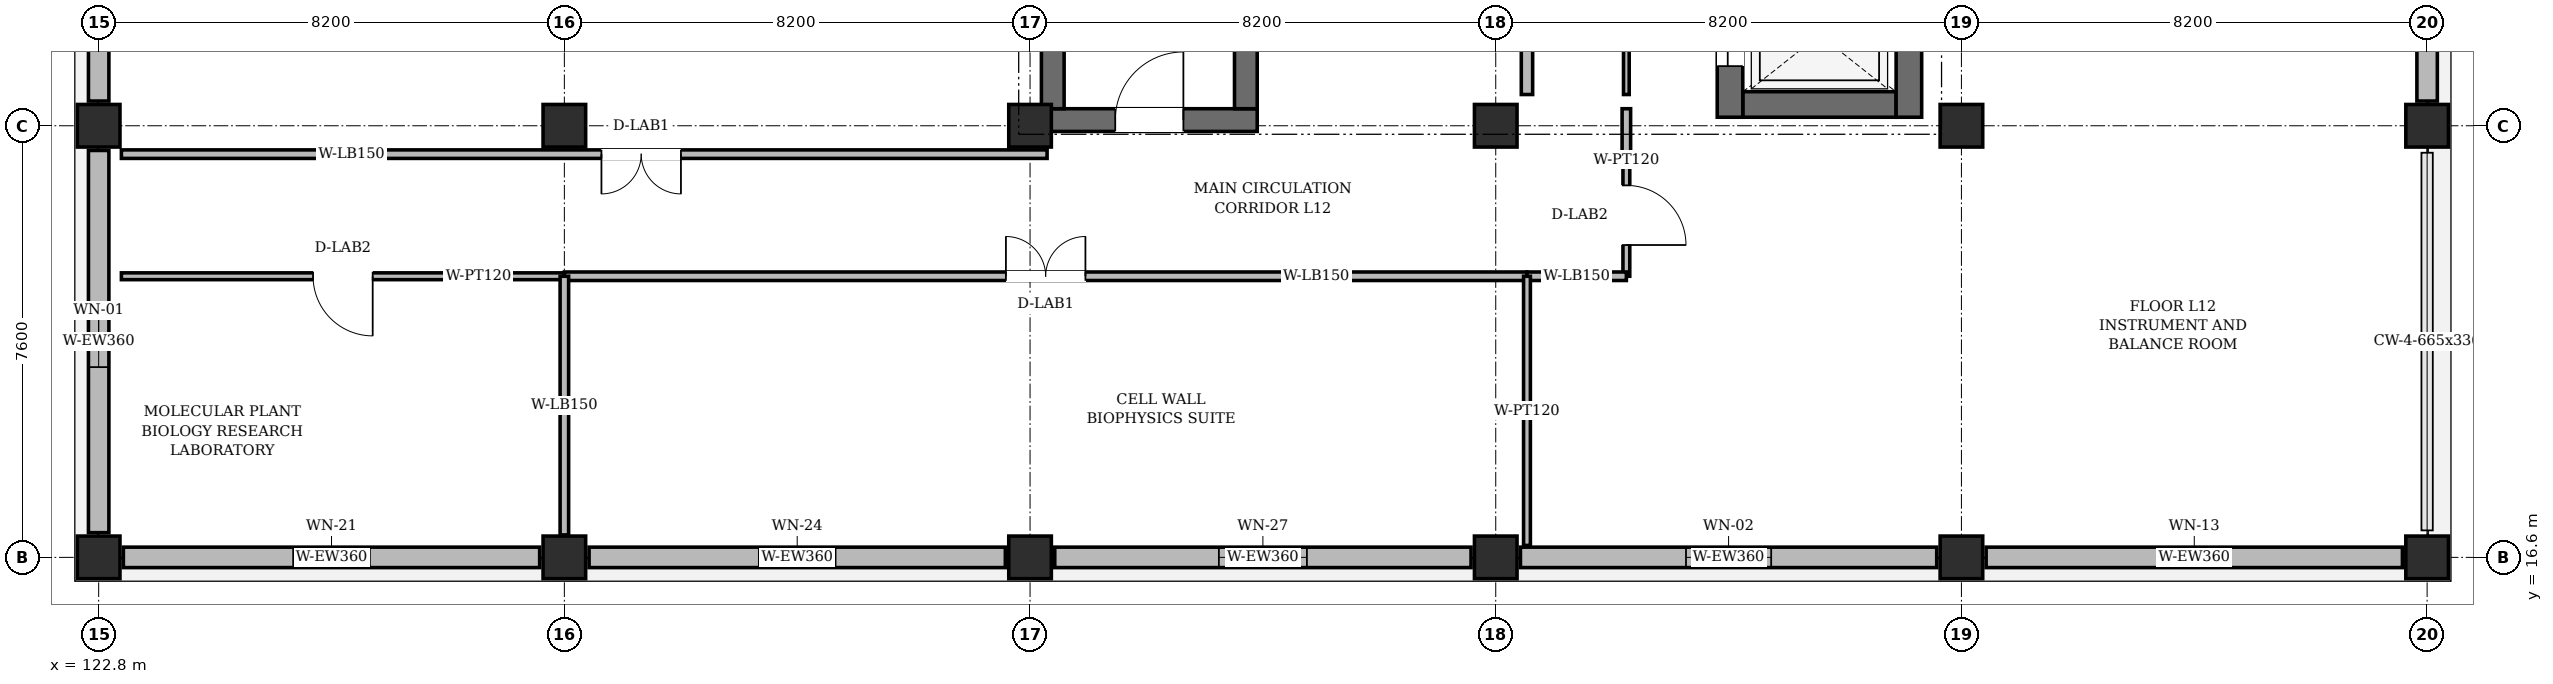
"""IFC4 building model, lengths in metres.
Left out: names, types, materials, properties, quantities, classifications, styles, units other than length and angle.
Written with IfcOpenShell. Run it as: python <this file> out.ifc"""

import sys

from ifc_helpers import new_model, si_unit, direction, frame, frame_2d, origin, origin_2d, place, context, subcontext, project, spatial, rectangle, extrude, element, fill, save


model = new_model("IFC4")
c1 = context("Model", 3, precision=1e-05, world=origin(), true_north=direction((0.0, 1.0)))
c2 = subcontext(c1, "Body", "Model", "MODEL_VIEW")
j1 = project(units=[si_unit("LENGTHUNIT", "METRE"), si_unit("PLANEANGLEUNIT", "RADIAN")], contexts=[c1])
p1 = place(None, origin())
s1 = spatial("IfcSite", under=j1, at=p1, CompositionType="ELEMENT")
p2 = place(p1, origin())
s2 = spatial("IfcBuilding", under=s1, at=p2, CompositionType="ELEMENT")
p3 = place(p2, frame((0.0, 0.0, 53.4)))
s3 = spatial("IfcBuildingStorey", under=s2, at=p3, CompositionType="ELEMENT", Elevation=53.4)
for number, where, z_axis, x_axis in (
    (1, (122.8, 16.6, 0.0), (0.0, 0.0, 1.0), (1.0, 0.0, 0.0)),
    (2, (122.8, 24.2, 0.0), (0.0, 0.0, 1.0), (1.0, 0.0, 0.0)),
    (3, (131.0, 16.6, 0.0), (0.0, 0.0, 1.0), (1.0, 0.0, 0.0)),
    (4, (131.0, 24.2, 0.0), (0.0, 0.0, 1.0), (1.0, 0.0, 0.0)),
    (5, (139.2, 16.6, 0.0), (0.0, 0.0, 1.0), (1.0, 0.0, 0.0)),
    (6, (139.2, 24.2, 0.0), (0.0, 0.0, 1.0), (1.0, 0.0, 0.0)),
    (7, (147.4, 16.6, 0.0), (0.0, 0.0, 1.0), (1.0, 0.0, 0.0)),
    (8, (147.4, 24.2, 0.0), (0.0, 0.0, 1.0), (1.0, 0.0, 0.0)),
    (9, (155.6, 16.6, 0.0), (0.0, 0.0, 1.0), (1.0, 0.0, 0.0)),
    (10, (155.6, 24.2, 0.0), (0.0, 0.0, 1.0), (1.0, 0.0, 0.0)),
    (11, (163.8, 16.6, 0.0), (0.0, 0.0, 1.0), (1.0, 0.0, 0.0)),
    (12, (163.8, 24.2, 0.0), (0.0, 0.0, 1.0), (1.0, 0.0, 0.0)),
):
    element("IfcColumn", number, at=place(p3, frame(where, z_axis=z_axis, x_axis=x_axis)), inside=s3, PredefinedType="COLUMN", context=c2, shape_type="SweptSolid", body=[
        extrude(rectangle(XDim=0.75, YDim=0.75, at=origin_2d()), origin(), (0.0, 0.0, 1.0), 3.96),
    ])
p4 = place(p3, frame((123.235, 16.6, 0.0), z_axis=(0.0, 0.0, 1.0), x_axis=(1.0, 0.0, 0.0)))
e13 = element("IfcWall", 13, at=p4, inside=s3, PredefinedType="SOLIDWALL", context=c2, shape_type="SweptSolid", body=[
    extrude(rectangle(XDim=7.33, YDim=0.36, at=frame_2d((3.665, 0.0))), origin(), (0.0, 0.0, 1.0), 3.345),
])
p5 = place(p4, frame((2.99, 0.0, 0.95)))
e14 = element("IfcOpeningElement", 14, at=p5, cuts=e13, PredefinedType="OPENING", context=c2, shape_type="SweptSolid", body=[
    extrude(rectangle(XDim=1.35, YDim=1.25, at=frame_2d((0.675, 0.625))), frame((0.0, 0.192, 0.0), z_axis=(0.0, -1.0, 0.0), x_axis=(1.0, 0.0, 0.0)), (0.0, 0.0, 1.0), 0.384),
])
p6 = place(p3, frame((131.435, 16.6, 0.0), z_axis=(0.0, 0.0, 1.0), x_axis=(1.0, 0.0, 0.0)))
e15 = element("IfcWall", 15, at=p6, inside=s3, PredefinedType="SOLIDWALL", context=c2, shape_type="SweptSolid", body=[
    extrude(rectangle(XDim=7.33, YDim=0.36, at=frame_2d((3.665, 0.0))), origin(), (0.0, 0.0, 1.0), 3.345),
])
p7 = place(p6, frame((2.99, 0.0, 0.95)))
e16 = element("IfcOpeningElement", 16, at=p7, cuts=e15, PredefinedType="OPENING", context=c2, shape_type="SweptSolid", body=[
    extrude(rectangle(XDim=1.35, YDim=2.05, at=frame_2d((0.675, 1.025))), frame((0.0, 0.192, 0.0), z_axis=(0.0, -1.0, 0.0), x_axis=(1.0, 0.0, 0.0)), (0.0, 0.0, 1.0), 0.384),
])
p8 = place(p3, frame((139.635, 16.6, 0.0), z_axis=(0.0, 0.0, 1.0), x_axis=(1.0, 0.0, 0.0)))
e17 = element("IfcWall", 17, at=p8, inside=s3, PredefinedType="SOLIDWALL", context=c2, shape_type="SweptSolid", body=[
    extrude(rectangle(XDim=7.33, YDim=0.36, at=frame_2d((3.665, 0.0))), origin(), (0.0, 0.0, 1.0), 3.345),
])
p9 = place(p8, frame((2.89, 0.0, 0.95)))
e18 = element("IfcOpeningElement", 18, at=p9, cuts=e17, PredefinedType="OPENING", context=c2, shape_type="SweptSolid", body=[
    extrude(rectangle(XDim=1.55, YDim=1.75, at=frame_2d((0.775, 0.875))), frame((0.0, 0.192, 0.0), z_axis=(0.0, -1.0, 0.0), x_axis=(1.0, 0.0, 0.0)), (0.0, 0.0, 1.0), 0.384),
])
p10 = place(p3, frame((147.835, 16.6, 0.0), z_axis=(0.0, 0.0, 1.0), x_axis=(1.0, 0.0, 0.0)))
e19 = element("IfcWall", 19, at=p10, inside=s3, PredefinedType="SOLIDWALL", context=c2, shape_type="SweptSolid", body=[
    extrude(rectangle(XDim=7.33, YDim=0.36, at=frame_2d((3.665, 0.0))), origin(), (0.0, 0.0, 1.0), 3.345),
])
p11 = place(p10, frame((2.915, 0.0, 0.95)))
e20 = element("IfcOpeningElement", 20, at=p11, cuts=e19, PredefinedType="OPENING", context=c2, shape_type="SweptSolid", body=[
    extrude(rectangle(XDim=1.5, YDim=2.1, at=frame_2d((0.75, 1.05))), frame((0.0, 0.192, 0.0), z_axis=(0.0, -1.0, 0.0), x_axis=(1.0, 0.0, 0.0)), (0.0, 0.0, 1.0), 0.384),
])
p12 = place(p3, frame((156.035, 16.6, 0.0), z_axis=(0.0, 0.0, 1.0), x_axis=(1.0, 0.0, 0.0)))
e21 = element("IfcWall", 21, at=p12, inside=s3, PredefinedType="SOLIDWALL", context=c2, shape_type="SweptSolid", body=[
    extrude(rectangle(XDim=7.33, YDim=0.36, at=frame_2d((3.665, 0.0))), origin(), (0.0, 0.0, 1.0), 3.345),
])
p13 = place(p12, frame((3.19, 0.0, 0.95)))
e22 = element("IfcOpeningElement", 22, at=p13, cuts=e21, PredefinedType="OPENING", context=c2, shape_type="SweptSolid", body=[
    extrude(rectangle(XDim=0.95, YDim=1.25, at=frame_2d((0.475, 0.625))), frame((0.0, 0.192, 0.0), z_axis=(0.0, -1.0, 0.0), x_axis=(1.0, 0.0, 0.0)), (0.0, 0.0, 1.0), 0.384),
])
p14 = place(p3, frame((163.8, 24.635, 0.0), z_axis=(0.0, 0.0, 1.0), x_axis=(0.0, 1.0, 0.0)))
e23 = element("IfcWall", 23, at=p14, inside=s3, PredefinedType="SOLIDWALL", context=c2, shape_type="SweptSolid", body=[
    extrude(rectangle(XDim=6.73, YDim=0.36, at=frame_2d((3.365, 0.0))), origin(), (0.0, 0.0, 1.0), 3.345),
])
p15 = place(p14, frame((2.59, 0.0, 0.95)))
e24 = element("IfcOpeningElement", 24, at=p15, cuts=e23, PredefinedType="OPENING", context=c2, shape_type="SweptSolid", body=[
    extrude(rectangle(XDim=1.55, YDim=1.25, at=frame_2d((0.775, 0.625))), frame((0.0, 0.192, 0.0), z_axis=(0.0, -1.0, 0.0), x_axis=(1.0, 0.0, 0.0)), (0.0, 0.0, 1.0), 0.384),
])
p16 = place(p3, frame((122.8, 31.365, 0.0), z_axis=(0.0, 0.0, 1.0), x_axis=(0.0, -1.0, 0.0)))
e25 = element("IfcWall", 25, at=p16, inside=s3, PredefinedType="SOLIDWALL", context=c2, shape_type="SweptSolid", body=[
    extrude(rectangle(XDim=6.73, YDim=0.36, at=frame_2d((3.365, 0.0))), origin(), (0.0, 0.0, 1.0), 3.345),
])
p17 = place(p16, frame((2.59, 0.0, 0.95)))
e26 = element("IfcOpeningElement", 26, at=p17, cuts=e25, PredefinedType="OPENING", context=c2, shape_type="SweptSolid", body=[
    extrude(rectangle(XDim=1.55, YDim=1.5, at=frame_2d((0.775, 0.75))), frame((0.0, 0.192, 0.0), z_axis=(0.0, -1.0, 0.0), x_axis=(1.0, 0.0, 0.0)), (0.0, 0.0, 1.0), 0.384),
])
p18 = place(p3, frame((122.8, 23.765, 0.0), z_axis=(0.0, 0.0, 1.0), x_axis=(0.0, -1.0, 0.0)))
e27 = element("IfcWall", 27, at=p18, inside=s3, PredefinedType="SOLIDWALL", context=c2, shape_type="SweptSolid", body=[
    extrude(rectangle(XDim=6.73, YDim=0.36, at=frame_2d((3.365, 0.0))), origin(), (0.0, 0.0, 1.0), 3.345),
])
p19 = place(p18, frame((2.915, 0.0, 0.95)))
e28 = element("IfcOpeningElement", 28, at=p19, cuts=e27, PredefinedType="OPENING", context=c2, shape_type="SweptSolid", body=[
    extrude(rectangle(XDim=0.9, YDim=2.1, at=frame_2d((0.45, 1.05))), frame((0.0, 0.192, 0.0), z_axis=(0.0, -1.0, 0.0), x_axis=(1.0, 0.0, 0.0)), (0.0, 0.0, 1.0), 0.384),
])
p20 = place(p3, frame((139.4, 24.3, 0.0), z_axis=(0.0, 0.0, 1.0), x_axis=(1.0, 0.0, 0.0)))
e29 = element("IfcWall", 29, at=p20, inside=s3, PredefinedType="SHEAR", context=c2, shape_type="SweptSolid", body=[
    extrude(rectangle(XDim=3.8, YDim=0.4, at=frame_2d((1.9, 0.0))), origin(), (0.0, 0.0, 1.0), 3.96),
])
p21 = place(p20, frame((1.3, 0.0, 0.0)))
e30 = element("IfcOpeningElement", 30, at=p21, cuts=e29, PredefinedType="OPENING", context=c2, shape_type="SweptSolid", body=[
    extrude(rectangle(XDim=1.2, YDim=2.2, at=frame_2d((0.6, 1.1))), frame((0.0, 0.212, 0.0), z_axis=(0.0, -1.0, 0.0), x_axis=(1.0, 0.0, 0.0)), (0.0, 0.0, 1.0), 0.424),
])
for number, where, z_axis, x_axis in (
    (31, (139.6, 24.5, 0.0), (0.0, 0.0, 1.0), (0.0, 1.0, 0.0)),
    (32, (143.0, 24.5, 0.0), (0.0, 0.0, 1.0), (0.0, 1.0, 0.0)),
):
    element("IfcWall", number, at=place(p3, frame(where, z_axis=z_axis, x_axis=x_axis)), inside=s3, PredefinedType="SHEAR", context=c2, shape_type="SweptSolid", body=[
        extrude(rectangle(XDim=7.0, YDim=0.4, at=frame_2d((3.5, 0.0))), origin(), (0.0, 0.0, 1.0), 3.96),
    ])
p22 = place(p3, frame((151.75, 24.575, 0.0), z_axis=(0.0, 0.0, 1.0), x_axis=(1.0, 0.0, 0.0)))
e33 = element("IfcWall", 33, at=p22, inside=s3, PredefinedType="SHEAR", context=c2, shape_type="SweptSolid", body=[
    extrude(rectangle(XDim=2.7, YDim=0.45, at=frame_2d((1.35, 0.0))), origin(), (0.0, 0.0, 1.0), 3.96),
])
p23 = place(p3, frame((151.525, 24.35, 0.0), z_axis=(0.0, 0.0, 1.0), x_axis=(0.0, 1.0, 0.0)))
e34 = element("IfcWall", 34, at=p23, inside=s3, PredefinedType="SHEAR", context=c2, shape_type="SweptSolid", body=[
    extrude(rectangle(XDim=2.9, YDim=0.45, at=frame_2d((1.45, 0.0))), origin(), (0.0, 0.0, 1.0), 3.96),
])
p24 = place(p23, frame((0.9, 0.0, 0.0)))
e35 = element("IfcOpeningElement", 35, at=p24, cuts=e34, PredefinedType="OPENING", context=c2, shape_type="SweptSolid", body=[
    extrude(rectangle(XDim=1.1, YDim=2.2, at=frame_2d((0.55, 1.1))), frame((0.0, 0.237, 0.0), z_axis=(0.0, -1.0, 0.0), x_axis=(1.0, 0.0, 0.0)), (0.0, 0.0, 1.0), 0.474),
])
p25 = place(p3, frame((154.675, 24.35, 0.0), z_axis=(0.0, 0.0, 1.0), x_axis=(0.0, 1.0, 0.0)))
e36 = element("IfcWall", 36, at=p25, inside=s3, PredefinedType="SHEAR", context=c2, shape_type="SweptSolid", body=[
    extrude(rectangle(XDim=2.9, YDim=0.45, at=frame_2d((1.45, 0.0))), origin(), (0.0, 0.0, 1.0), 3.96),
])
p26 = place(p3, frame((147.95, 31.75, 0.0), z_axis=(0.0, 0.0, 1.0), x_axis=(0.0, -1.0, 0.0)))
e37 = element("IfcWall", 37, at=p26, inside=s3, PredefinedType="PARTITIONING", context=c2, shape_type="SweptSolid", body=[
    extrude(rectangle(XDim=7.0, YDim=0.2, at=frame_2d((3.5, 0.0))), origin(), (0.0, 0.0, 1.0), 3.805),
])
p27 = place(p26, frame((2.75, 0.0, 0.0)))
e38 = element("IfcOpeningElement", 38, at=p27, cuts=e37, PredefinedType="OPENING", context=c2, shape_type="SweptSolid", body=[
    extrude(rectangle(XDim=1.5, YDim=2.2, at=frame_2d((0.75, 1.1))), frame((0.0, 0.112, 0.0), z_axis=(0.0, -1.0, 0.0), x_axis=(1.0, 0.0, 0.0)), (0.0, 0.0, 1.0), 0.224),
])
p28 = place(p3, frame((149.7, 24.75, 0.0), z_axis=(0.0, 0.0, 1.0), x_axis=(0.0, 1.0, 0.0)))
e39 = element("IfcWall", 39, at=p28, inside=s3, PredefinedType="PARTITIONING", context=c2, shape_type="SweptSolid", body=[
    extrude(rectangle(XDim=11.3, YDim=0.1, at=frame_2d((5.65, 0.0))), origin(), (0.0, 0.0, 1.0), 3.805),
])
p29 = place(p28, frame((4.75, 0.0, 0.0)))
e40 = element("IfcOpeningElement", 40, at=p29, cuts=e39, PredefinedType="OPENING", context=c2, shape_type="SweptSolid", body=[
    extrude(rectangle(XDim=1.8, YDim=2.4, at=frame_2d((0.9, 1.2))), frame((0.0, 0.062, 0.0), z_axis=(0.0, -1.0, 0.0), x_axis=(1.0, 0.0, 0.0)), (0.0, 0.0, 1.0), 0.124),
])
p30 = place(p3, frame((131.0, 21.55, 0.0), z_axis=(0.0, 0.0, 1.0), x_axis=(-1.0, 0.0, 0.0)))
e41 = element("IfcWall", 41, at=p30, inside=s3, PredefinedType="PARTITIONING", context=c2, shape_type="SweptSolid", body=[
    extrude(rectangle(XDim=7.8, YDim=0.12, at=frame_2d((3.9, 0.0))), origin(), (0.0, 0.0, 1.0), 3.635),
])
p31 = place(p30, frame((3.375, 0.0, 0.0)))
e42 = element("IfcOpeningElement", 42, at=p31, cuts=e41, PredefinedType="OPENING", context=c2, shape_type="SweptSolid", body=[
    extrude(rectangle(XDim=1.05, YDim=2.2, at=frame_2d((0.525, 1.1))), frame((0.0, 0.072, 0.0), z_axis=(0.0, -1.0, 0.0), x_axis=(1.0, 0.0, 0.0)), (0.0, 0.0, 1.0), 0.144),
])
p32 = place(p3, frame((147.95, 21.55, 0.0), z_axis=(0.0, 0.0, 1.0), x_axis=(-1.0, 0.0, 0.0)))
e43 = element("IfcWall", 43, at=p32, inside=s3, PredefinedType="PARTITIONING", context=c2, shape_type="SweptSolid", body=[
    extrude(rectangle(XDim=16.95, YDim=0.15, at=frame_2d((8.475, 0.0))), origin(), (0.0, 0.0, 1.0), 3.535),
])
p33 = place(p32, frame((7.775, 0.0, 0.0)))
e44 = element("IfcOpeningElement", 44, at=p33, cuts=e43, PredefinedType="OPENING", context=c2, shape_type="SweptSolid", body=[
    extrude(rectangle(XDim=1.4, YDim=2.2, at=frame_2d((0.7, 1.1))), frame((0.0, 0.087, 0.0), z_axis=(0.0, -1.0, 0.0), x_axis=(1.0, 0.0, 0.0)), (0.0, 0.0, 1.0), 0.174),
])
p34 = place(p3, frame((149.7, 24.5, 0.0), z_axis=(0.0, 0.0, 1.0), x_axis=(0.0, -1.0, 0.0)))
e45 = element("IfcWall", 45, at=p34, inside=s3, PredefinedType="PARTITIONING", context=c2, shape_type="SweptSolid", body=[
    extrude(rectangle(XDim=0.8, YDim=0.15, at=frame_2d((0.4, 0.0))), origin(), (0.0, 0.0, 1.0), 3.805),
])
p35 = place(p3, frame((149.7, 23.7, 0.0), z_axis=(0.0, 0.0, 1.0), x_axis=(0.0, -1.0, 0.0)))
e46 = element("IfcWall", 46, at=p35, inside=s3, PredefinedType="PARTITIONING", context=c2, shape_type="SweptSolid", body=[
    extrude(rectangle(XDim=2.15, YDim=0.12, at=frame_2d((1.075, 0.0))), origin(), (0.0, 0.0, 1.0), 3.805),
])
p36 = place(p35, frame((0.55, 0.0, 0.0)))
e47 = element("IfcOpeningElement", 47, at=p36, cuts=e46, PredefinedType="OPENING", context=c2, shape_type="SweptSolid", body=[
    extrude(rectangle(XDim=1.05, YDim=2.2, at=frame_2d((0.525, 1.1))), frame((0.0, 0.072, 0.0), z_axis=(0.0, -1.0, 0.0), x_axis=(1.0, 0.0, 0.0)), (0.0, 0.0, 1.0), 0.144),
])
p37 = place(p3, frame((149.7, 21.55, 0.0), z_axis=(0.0, 0.0, 1.0), x_axis=(-1.0, 0.0, 0.0)))
e48 = element("IfcWall", 48, at=p37, inside=s3, PredefinedType="PARTITIONING", context=c2, shape_type="SweptSolid", body=[
    extrude(rectangle(XDim=1.75, YDim=0.15, at=frame_2d((0.875, 0.0))), origin(), (0.0, 0.0, 1.0), 3.535),
])
p38 = place(p3, frame((123.2, 23.7, 0.0), z_axis=(0.0, 0.0, 1.0), x_axis=(1.0, 0.0, 0.0)))
e49 = element("IfcWall", 49, at=p38, inside=s3, PredefinedType="PARTITIONING", context=c2, shape_type="SweptSolid", body=[
    extrude(rectangle(XDim=16.3, YDim=0.15, at=frame_2d((8.15, 0.0))), origin(), (0.0, 0.0, 1.0), 3.805),
])
p39 = place(p38, frame((8.453, 0.0, 0.0)))
e50 = element("IfcOpeningElement", 50, at=p39, cuts=e49, PredefinedType="OPENING", context=c2, shape_type="SweptSolid", body=[
    extrude(rectangle(XDim=1.4, YDim=2.2, at=frame_2d((0.7, 1.1))), frame((0.0, 0.087, 0.0), z_axis=(0.0, -1.0, 0.0), x_axis=(1.0, 0.0, 0.0)), (0.0, 0.0, 1.0), 0.174),
])
p40 = place(p3, frame((131.0, 21.55, 0.0), z_axis=(0.0, 0.0, 1.0), x_axis=(0.0, -1.0, 0.0)))
e51 = element("IfcWall", 51, at=p40, inside=s3, PredefinedType="PARTITIONING", context=c2, shape_type="SweptSolid", body=[
    extrude(rectangle(XDim=4.555, YDim=0.15, at=frame_2d((2.277, 0.0))), origin(), (0.0, 0.0, 1.0), 3.295),
])
p41 = place(p3, frame((147.95, 21.55, 0.0), z_axis=(0.0, 0.0, 1.0), x_axis=(0.0, -1.0, 0.0)))
e52 = element("IfcWall", 52, at=p41, inside=s3, PredefinedType="PARTITIONING", context=c2, shape_type="SweptSolid", body=[
    extrude(rectangle(XDim=4.74, YDim=0.12, at=frame_2d((2.37, 0.0))), origin(), (0.0, 0.0, 1.0), 3.805),
])
p42 = place(p5, origin())
e53 = element("IfcWindow", 53, at=p42, inside=s3, PartitioningType="SINGLE_PANEL", PredefinedType="WINDOW", context=c2, shape_type="SweptSolid", body=[
    extrude(rectangle(XDim=1.35, YDim=1.25, at=frame_2d((0.675, 0.625))), frame((0.0, 0.03, 0.0), z_axis=(0.0, -1.0, 0.0), x_axis=(1.0, 0.0, 0.0)), (0.0, 0.0, 1.0), 0.06),
])
fill(e14, e53)
p43 = place(p7, origin())
e54 = element("IfcWindow", 54, at=p43, inside=s3, PartitioningType="SINGLE_PANEL", PredefinedType="WINDOW", context=c2, shape_type="SweptSolid", body=[
    extrude(rectangle(XDim=1.35, YDim=2.05, at=frame_2d((0.675, 1.025))), frame((0.0, 0.03, 0.0), z_axis=(0.0, -1.0, 0.0), x_axis=(1.0, 0.0, 0.0)), (0.0, 0.0, 1.0), 0.06),
])
fill(e16, e54)
p44 = place(p9, origin())
e55 = element("IfcWindow", 55, at=p44, inside=s3, PartitioningType="DOUBLE_PANEL_VERTICAL", PredefinedType="WINDOW", context=c2, shape_type="SweptSolid", body=[
    extrude(rectangle(XDim=1.55, YDim=1.75, at=frame_2d((0.775, 0.875))), frame((0.0, 0.03, 0.0), z_axis=(0.0, -1.0, 0.0), x_axis=(1.0, 0.0, 0.0)), (0.0, 0.0, 1.0), 0.06),
])
fill(e18, e55)
p45 = place(p11, origin())
e56 = element("IfcWindow", 56, at=p45, inside=s3, PartitioningType="DOUBLE_PANEL_VERTICAL", PredefinedType="WINDOW", context=c2, shape_type="SweptSolid", body=[
    extrude(rectangle(XDim=1.5, YDim=2.1, at=frame_2d((0.75, 1.05))), frame((0.0, 0.03, 0.0), z_axis=(0.0, -1.0, 0.0), x_axis=(1.0, 0.0, 0.0)), (0.0, 0.0, 1.0), 0.06),
])
fill(e20, e56)
p46 = place(p13, origin())
e57 = element("IfcWindow", 57, at=p46, inside=s3, PartitioningType="SINGLE_PANEL", PredefinedType="WINDOW", context=c2, shape_type="SweptSolid", body=[
    extrude(rectangle(XDim=0.95, YDim=1.25, at=frame_2d((0.475, 0.625))), frame((0.0, 0.03, 0.0), z_axis=(0.0, -1.0, 0.0), x_axis=(1.0, 0.0, 0.0)), (0.0, 0.0, 1.0), 0.06),
])
fill(e22, e57)
p47 = place(p19, origin())
e58 = element("IfcWindow", 58, at=p47, inside=s3, PartitioningType="SINGLE_PANEL", PredefinedType="WINDOW", context=c2, shape_type="SweptSolid", body=[
    extrude(rectangle(XDim=0.9, YDim=2.1, at=frame_2d((0.45, 1.05))), frame((0.0, 0.03, 0.0), z_axis=(0.0, -1.0, 0.0), x_axis=(1.0, 0.0, 0.0)), (0.0, 0.0, 1.0), 0.06),
])
fill(e28, e58)
p48 = place(p21, origin())
e59 = element("IfcDoor", 59, at=p48, inside=s3, OperationType="SINGLE_SWING_RIGHT", PredefinedType="DOOR", context=c2, shape_type="SweptSolid", body=[
    extrude(rectangle(XDim=1.2, YDim=2.2, at=frame_2d((0.6, 1.1))), frame((0.0, 0.025, 0.0), z_axis=(0.0, -1.0, 0.0), x_axis=(1.0, 0.0, 0.0)), (0.0, 0.0, 1.0), 0.05),
])
fill(e30, e59)
p49 = place(p24, origin())
e60 = element("IfcDoor", 60, at=p49, inside=s3, OperationType="DOUBLE_DOOR_SLIDING", PredefinedType="DOOR", context=c2, shape_type="SweptSolid", body=[
    extrude(rectangle(XDim=1.1, YDim=2.2, at=frame_2d((0.55, 1.1))), frame((0.0, 0.025, 0.0), z_axis=(0.0, -1.0, 0.0), x_axis=(1.0, 0.0, 0.0)), (0.0, 0.0, 1.0), 0.05),
])
fill(e35, e60)
p50 = place(p31, origin())
e61 = element("IfcDoor", 61, at=p50, inside=s3, OperationType="SINGLE_SWING_LEFT", PredefinedType="DOOR", context=c2, shape_type="SweptSolid", body=[
    extrude(rectangle(XDim=1.05, YDim=2.2, at=frame_2d((0.525, 1.1))), frame((0.0, 0.025, 0.0), z_axis=(0.0, -1.0, 0.0), x_axis=(1.0, 0.0, 0.0)), (0.0, 0.0, 1.0), 0.05),
])
fill(e42, e61)
p51 = place(p33, frame((1.4, 0.0, 0.0), z_axis=(0.0, 0.0, 1.0), x_axis=(-1.0, 0.0, 0.0)))
e62 = element("IfcDoor", 62, at=p51, inside=s3, OperationType="DOUBLE_DOOR_SINGLE_SWING", PredefinedType="DOOR", context=c2, shape_type="SweptSolid", body=[
    extrude(rectangle(XDim=1.4, YDim=2.2, at=frame_2d((0.7, 1.1))), frame((0.0, 0.025, 0.0), z_axis=(0.0, -1.0, 0.0), x_axis=(1.0, 0.0, 0.0)), (0.0, 0.0, 1.0), 0.05),
])
fill(e44, e62)
p52 = place(p36, origin())
e63 = element("IfcDoor", 63, at=p52, inside=s3, OperationType="SINGLE_SWING_RIGHT", PredefinedType="DOOR", context=c2, shape_type="SweptSolid", body=[
    extrude(rectangle(XDim=1.05, YDim=2.2, at=frame_2d((0.525, 1.1))), frame((0.0, 0.025, 0.0), z_axis=(0.0, -1.0, 0.0), x_axis=(1.0, 0.0, 0.0)), (0.0, 0.0, 1.0), 0.05),
])
fill(e47, e63)
p53 = place(p39, frame((1.4, 0.0, 0.0), z_axis=(0.0, 0.0, 1.0), x_axis=(-1.0, 0.0, 0.0)))
e64 = element("IfcDoor", 64, at=p53, inside=s3, OperationType="DOUBLE_DOOR_SINGLE_SWING", PredefinedType="DOOR", context=c2, shape_type="SweptSolid", body=[
    extrude(rectangle(XDim=1.4, YDim=2.2, at=frame_2d((0.7, 1.1))), frame((0.0, 0.025, 0.0), z_axis=(0.0, -1.0, 0.0), x_axis=(1.0, 0.0, 0.0)), (0.0, 0.0, 1.0), 0.05),
])
fill(e50, e64)
save(model, sys.argv[1])
